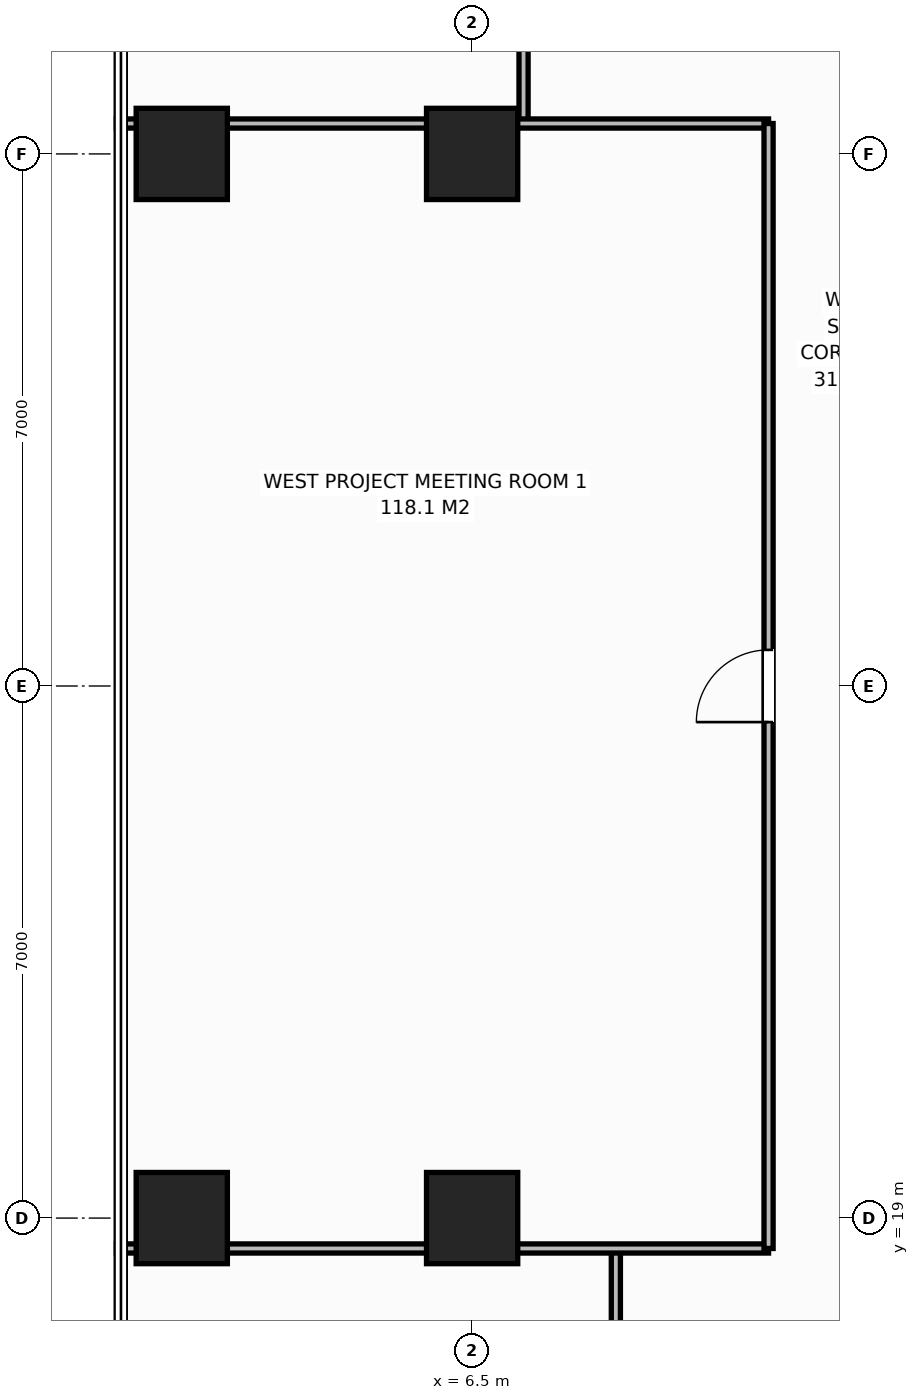
"""IFC4 building model, lengths in metres.
Left out: names, types, materials, properties, quantities, classifications, styles, units other than length and angle.
Written with IfcOpenShell. Run it as: python <this file> out.ifc"""

import sys

from ifc_helpers import new_model, si_unit, direction, frame, frame_2d, origin, origin_2d, place, context, subcontext, project, spatial, rectangle, extrude, element, fill, save


model = new_model("IFC4")
c1 = context("Model", 3, precision=1e-05, world=origin(), true_north=direction((0.0, 1.0)))
c2 = subcontext(c1, "Body", "Model", "MODEL_VIEW")
j1 = project(units=[si_unit("LENGTHUNIT", "METRE"), si_unit("PLANEANGLEUNIT", "RADIAN")], contexts=[c1])
p1 = place(None, origin())
s1 = spatial("IfcSite", under=j1, at=p1, CompositionType="ELEMENT")
p2 = place(p1, origin())
s2 = spatial("IfcBuilding", under=s1, at=p2, CompositionType="ELEMENT")
p3 = place(p2, frame((0.0, 0.0, 135.4)))
s3 = spatial("IfcBuildingStorey", under=s2, at=p3, CompositionType="ELEMENT", Elevation=135.4)
for number, where, z_axis, x_axis in (
    (1, (6.5, 19.0, 0.0), (0.0, 0.0, 1.0), (1.0, 0.0, 0.0)),
    (2, (6.5, 33.0, 0.0), (0.0, 0.0, 1.0), (1.0, 0.0, 0.0)),
    (3, (2.68, 19.0, 0.0), (0.0, 0.0, 1.0), (1.0, 0.0, 0.0)),
    (4, (2.68, 33.0, 0.0), (0.0, 0.0, 1.0), (1.0, 0.0, 0.0)),
):
    element("IfcColumn", number, at=place(p3, frame(where, z_axis=z_axis, x_axis=x_axis)), inside=s3, PredefinedType="COLUMN", context=c2, shape_type="SweptSolid", body=[
        extrude(rectangle(XDim=1.2, YDim=1.2, at=origin_2d()), origin(), (0.0, 0.0, 1.0), 3.8),
    ])
for number, where, z_axis, x_axis in (
    (5, (7.177, 33.4, 0.0), (0.0, 0.0, 1.0), (0.0, 1.0, 0.0)),
    (6, (8.391, 16.5, 0.0), (0.0, 0.0, 1.0), (0.0, 1.0, 0.0)),
):
    element("IfcWall", number, at=place(p3, frame(where, z_axis=z_axis, x_axis=x_axis)), inside=s3, PredefinedType="PARTITIONING", context=c2, shape_type="SweptSolid", body=[
        extrude(rectangle(XDim=2.1, YDim=0.12, at=frame_2d((1.05, 0.0))), origin(), (0.0, 0.0, 1.0), 3.52),
    ])
for number, where, z_axis, x_axis in (
    (7, (1.82, 18.6, 0.0), (0.0, 0.0, 1.0), (1.0, 0.0, 0.0)),
    (8, (1.82, 33.4, 0.0), (0.0, 0.0, 1.0), (1.0, 0.0, 0.0)),
):
    element("IfcWall", number, at=place(p3, frame(where, z_axis=z_axis, x_axis=x_axis)), inside=s3, PredefinedType="PARTITIONING", context=c2, shape_type="SweptSolid", body=[
        extrude(rectangle(XDim=8.58, YDim=0.12, at=frame_2d((4.29, 0.0))), origin(), (0.0, 0.0, 1.0), 3.52),
    ])
p4 = place(p3, frame((10.4, 18.6, 0.0), z_axis=(0.0, 0.0, 1.0), x_axis=(0.0, 1.0, 0.0)))
e9 = element("IfcWall", 9, at=p4, inside=s3, PredefinedType="PARTITIONING", context=c2, shape_type="SweptSolid", body=[
    extrude(rectangle(XDim=14.8, YDim=0.12, at=frame_2d((7.4, 0.0))), origin(), (0.0, 0.0, 1.0), 3.52),
])
p5 = place(p4, frame((6.925, 0.0, 0.0)))
e10 = element("IfcOpeningElement", 10, at=p5, cuts=e9, PredefinedType="OPENING", context=c2, shape_type="SweptSolid", body=[
    extrude(rectangle(XDim=0.95, YDim=2.15, at=frame_2d((0.475, 1.075))), frame((0.0, 0.07, 0.0), z_axis=(0.0, -1.0, 0.0), x_axis=(1.0, 0.0, 0.0)), (0.0, 0.0, 1.0), 0.14),
])
p6 = place(p5, origin())
e11 = element("IfcDoor", 11, at=p6, inside=s3, OperationType="SINGLE_SWING_LEFT", PredefinedType="DOOR", context=c2, shape_type="SweptSolid", body=[
    extrude(rectangle(XDim=0.95, YDim=2.15, at=frame_2d((0.475, 1.075))), frame((0.0, 0.025, 0.0), z_axis=(0.0, -1.0, 0.0), x_axis=(1.0, 0.0, 0.0)), (0.0, 0.0, 1.0), 0.05),
])
fill(e10, e11)
save(model, sys.argv[1])
